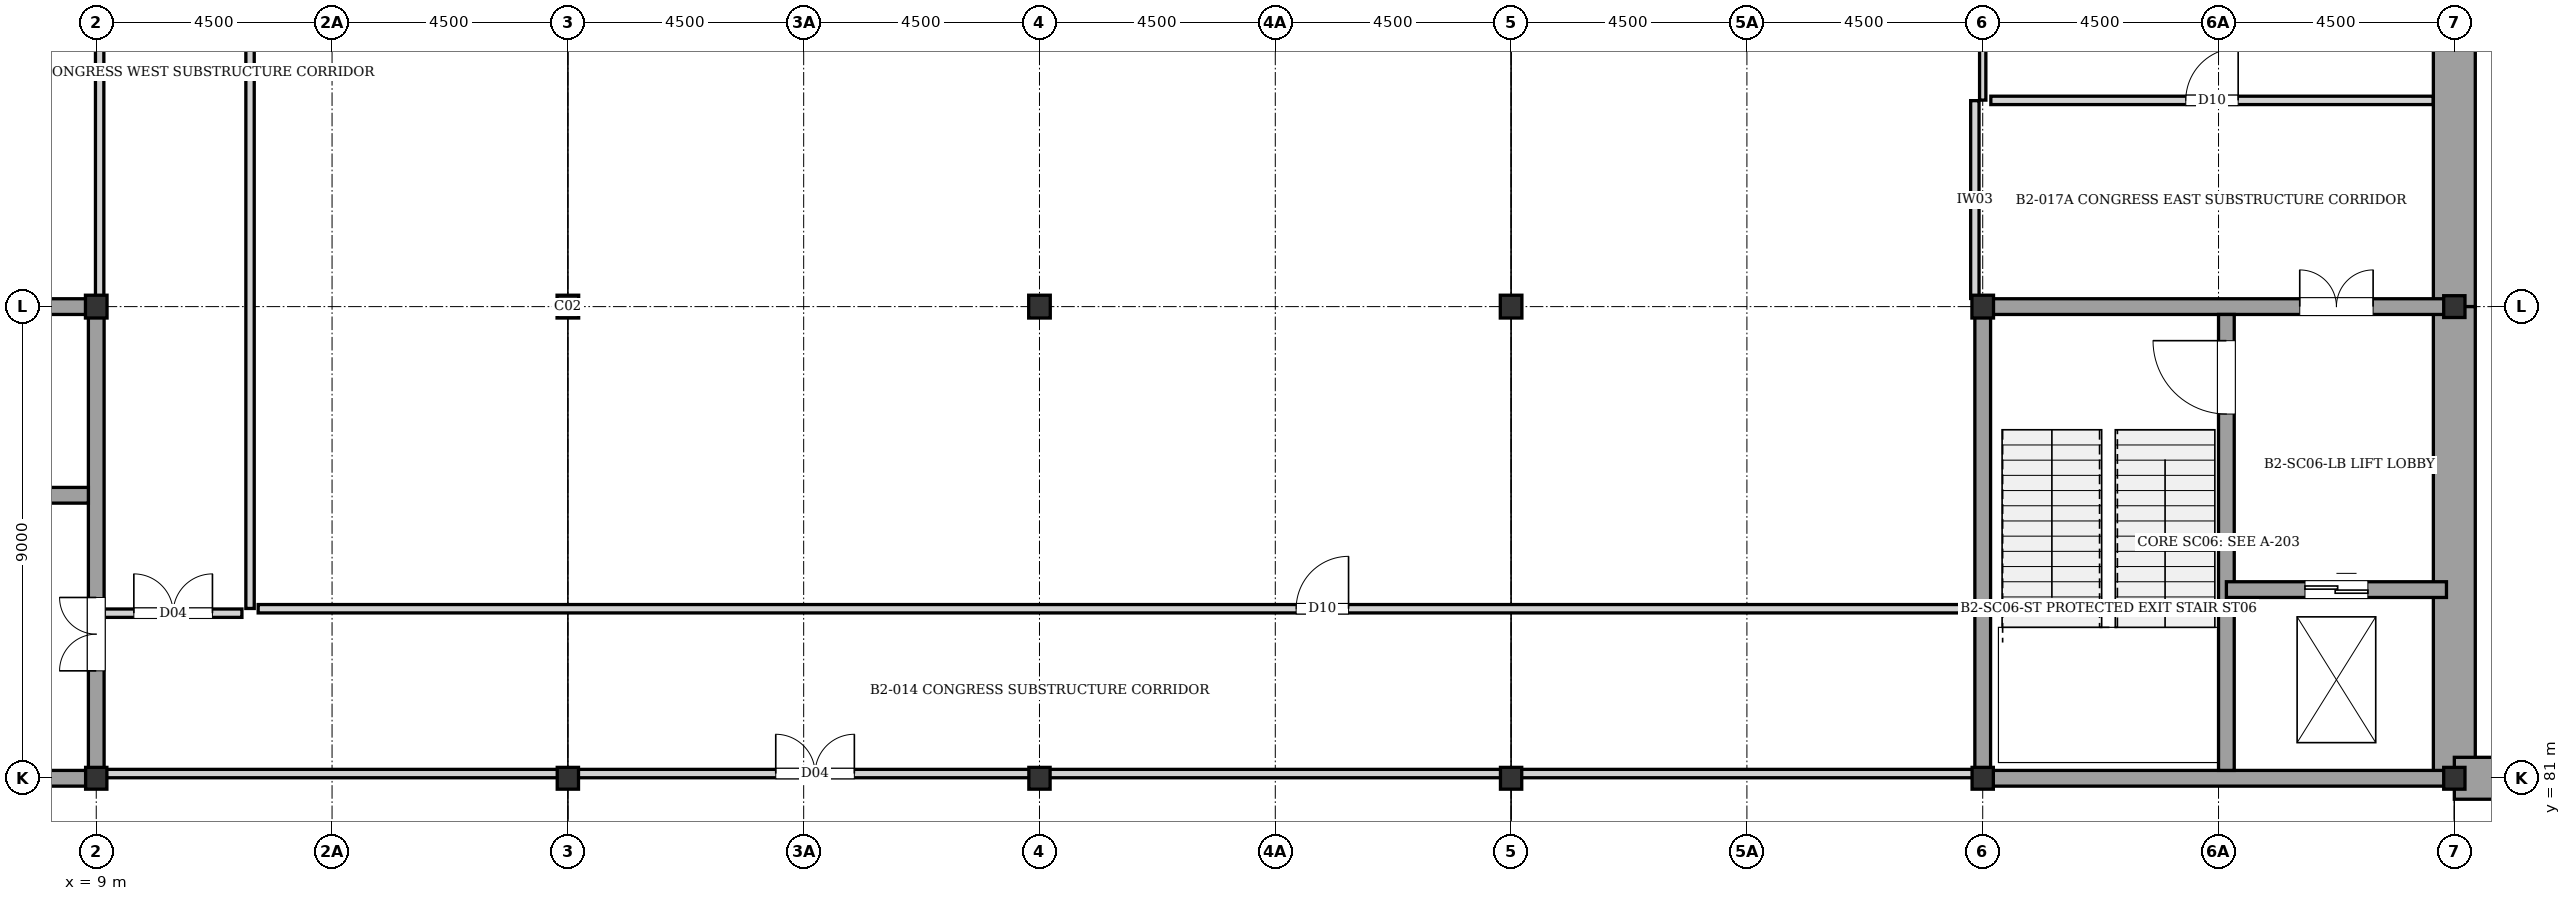
"""IFC4 building model, lengths in metres.
Left out: names, types, materials, properties, quantities, classifications, styles, units other than length and angle.
Written with IfcOpenShell. Run it as: python <this file> out.ifc"""

import sys

from ifc_helpers import new_model, si_unit, direction, frame, frame_2d, origin, origin_2d, place, context, subcontext, project, spatial, rectangle, i_section, extrude, element, fill, save


model = new_model("IFC4")
c1 = context("Model", 3, precision=1e-05, world=origin(), true_north=direction((0.0, 1.0)))
c2 = subcontext(c1, "Body", "Model", "MODEL_VIEW")
j1 = project(units=[si_unit("LENGTHUNIT", "METRE"), si_unit("PLANEANGLEUNIT", "RADIAN")], contexts=[c1])
p1 = place(None, origin())
s1 = spatial("IfcSite", under=j1, at=p1, CompositionType="ELEMENT")
p2 = place(p1, origin())
s2 = spatial("IfcBuilding", under=s1, at=p2, CompositionType="ELEMENT")
p3 = place(p2, frame((0.0, 0.0, -8.96)))
s3 = spatial("IfcBuildingStorey", under=s2, at=p3, CompositionType="ELEMENT", Elevation=-8.96)
p4 = place(p3, frame((9.0, 81.0, 0.0), z_axis=(0.0, 0.0, 1.0), x_axis=(1.0, 0.0, 0.0)))
e1 = element("IfcColumn", 1, at=p4, inside=s3, PredefinedType="COLUMN", context=c2, shape_type="SweptSolid", body=[
    extrude(i_section(OverallWidth=0.406, OverallDepth=0.416, WebThickness=0.022, FlangeThickness=0.038, at=origin_2d()), origin(), (0.0, 0.0, 1.0), 4.48),
])
p5 = place(p3, frame((9.0, 90.0, 0.0), z_axis=(0.0, 0.0, 1.0), x_axis=(1.0, 0.0, 0.0)))
e2 = element("IfcColumn", 2, at=p5, inside=s3, PredefinedType="COLUMN", context=c2, shape_type="SweptSolid", body=[
    extrude(i_section(OverallWidth=0.412, OverallDepth=0.435, WebThickness=0.027, FlangeThickness=0.046, at=origin_2d()), origin(), (0.0, 0.0, 1.0), 4.48),
])
p6 = place(p3, frame((18.0, 81.0, 0.0), z_axis=(0.0, 0.0, 1.0), x_axis=(1.0, 0.0, 0.0)))
e3 = element("IfcColumn", 3, at=p6, inside=s3, PredefinedType="COLUMN", context=c2, shape_type="SweptSolid", body=[
    extrude(i_section(OverallWidth=0.406, OverallDepth=0.416, WebThickness=0.022, FlangeThickness=0.038, at=origin_2d()), origin(), (0.0, 0.0, 1.0), 4.48),
])
p7 = place(p3, frame((18.0, 90.0, 0.0), z_axis=(0.0, 0.0, 1.0), x_axis=(1.0, 0.0, 0.0)))
e4 = element("IfcColumn", 4, at=p7, inside=s3, PredefinedType="COLUMN", context=c2, shape_type="SweptSolid", body=[
    extrude(i_section(OverallWidth=0.412, OverallDepth=0.435, WebThickness=0.027, FlangeThickness=0.046, at=origin_2d()), origin(), (0.0, 0.0, 1.0), 4.48),
])
p8 = place(p3, frame((27.0, 81.0, 0.0), z_axis=(0.0, 0.0, 1.0), x_axis=(1.0, 0.0, 0.0)))
e5 = element("IfcColumn", 5, at=p8, inside=s3, PredefinedType="COLUMN", context=c2, shape_type="SweptSolid", body=[
    extrude(i_section(OverallWidth=0.406, OverallDepth=0.416, WebThickness=0.022, FlangeThickness=0.038, at=origin_2d()), origin(), (0.0, 0.0, 1.0), 4.48),
])
p9 = place(p3, frame((27.0, 90.0, 0.0), z_axis=(0.0, 0.0, 1.0), x_axis=(1.0, 0.0, 0.0)))
e6 = element("IfcColumn", 6, at=p9, inside=s3, PredefinedType="COLUMN", context=c2, shape_type="SweptSolid", body=[
    extrude(i_section(OverallWidth=0.412, OverallDepth=0.435, WebThickness=0.027, FlangeThickness=0.046, at=origin_2d()), origin(), (0.0, 0.0, 1.0), 4.48),
])
p10 = place(p3, frame((36.0, 81.0, 0.0), z_axis=(0.0, 0.0, 1.0), x_axis=(1.0, 0.0, 0.0)))
e7 = element("IfcColumn", 7, at=p10, inside=s3, PredefinedType="COLUMN", context=c2, shape_type="SweptSolid", body=[
    extrude(i_section(OverallWidth=0.406, OverallDepth=0.416, WebThickness=0.022, FlangeThickness=0.038, at=origin_2d()), origin(), (0.0, 0.0, 1.0), 4.48),
])
p11 = place(p3, frame((36.0, 90.0, 0.0), z_axis=(0.0, 0.0, 1.0), x_axis=(1.0, 0.0, 0.0)))
e8 = element("IfcColumn", 8, at=p11, inside=s3, PredefinedType="COLUMN", context=c2, shape_type="SweptSolid", body=[
    extrude(i_section(OverallWidth=0.412, OverallDepth=0.435, WebThickness=0.027, FlangeThickness=0.046, at=origin_2d()), origin(), (0.0, 0.0, 1.0), 4.48),
])
p12 = place(p3, frame((45.0, 81.0, 0.0), z_axis=(0.0, 0.0, 1.0), x_axis=(1.0, 0.0, 0.0)))
e9 = element("IfcColumn", 9, at=p12, inside=s3, PredefinedType="COLUMN", context=c2, shape_type="SweptSolid", body=[
    extrude(i_section(OverallWidth=0.406, OverallDepth=0.416, WebThickness=0.022, FlangeThickness=0.038, at=origin_2d()), origin(), (0.0, 0.0, 1.0), 4.48),
])
p13 = place(p3, frame((45.0, 90.0, 0.0), z_axis=(0.0, 0.0, 1.0), x_axis=(1.0, 0.0, 0.0)))
e10 = element("IfcColumn", 10, at=p13, inside=s3, PredefinedType="COLUMN", context=c2, shape_type="SweptSolid", body=[
    extrude(i_section(OverallWidth=0.412, OverallDepth=0.435, WebThickness=0.027, FlangeThickness=0.046, at=origin_2d()), origin(), (0.0, 0.0, 1.0), 4.48),
])
for number, where, z_axis, x_axis in (
    (11, (54.0, 81.0, 0.0), (0.0, 0.0, 1.0), (1.0, 0.0, 0.0)),
    (12, (54.0, 90.0, 0.0), (0.0, 0.0, 1.0), (1.0, 0.0, 0.0)),
):
    element("IfcColumn", number, at=place(p3, frame(where, z_axis=z_axis, x_axis=x_axis)), inside=s3, PredefinedType="COLUMN", context=c2, shape_type="SweptSolid", body=[
        extrude(i_section(OverallWidth=0.406, OverallDepth=0.416, WebThickness=0.022, FlangeThickness=0.038, at=origin_2d()), origin(), (0.0, 0.0, 1.0), 4.48),
    ])
for number, where, z_axis, x_axis in (
    (13, (54.0, 99.0, 0.0), (0.0, 0.0, 1.0), (0.0, -1.0, 0.0)),
    (14, (54.0, 90.0, 0.0), (0.0, 0.0, 1.0), (0.0, -1.0, 0.0)),
):
    element("IfcWall", number, at=place(p3, frame(where, z_axis=z_axis, x_axis=x_axis)), inside=s3, PredefinedType="USERDEFINED", context=c2, shape_type="SweptSolid", body=[
        extrude(rectangle(XDim=9.0, YDim=0.8, at=frame_2d((4.5, 0.0))), origin(), (0.0, 0.0, 1.0), 4.2),
    ])
p14 = place(p3, frame((54.0, 81.0, 0.0), z_axis=(0.0, 0.0, 1.0), x_axis=(1.0, 0.0, 0.0)))
e15 = element("IfcWall", 15, at=p14, inside=s3, PredefinedType="USERDEFINED", context=c2, shape_type="SweptSolid", body=[
    extrude(rectangle(XDim=9.0, YDim=0.8, at=frame_2d((4.5, 0.0))), origin(), (0.0, 0.0, 1.0), 4.03),
])
p15 = place(p3, frame((0.0, 81.0, 0.0), z_axis=(0.0, 0.0, 1.0), x_axis=(1.0, 0.0, 0.0)))
e16 = element("IfcWall", 16, at=p15, inside=s3, PredefinedType="SHEAR", context=c2, shape_type="SweptSolid", body=[
    extrude(rectangle(XDim=9.0, YDim=0.3, at=frame_2d((4.5, 0.0))), origin(), (0.0, 0.0, 1.0), 4.2),
])
p16 = place(p3, frame((9.0, 81.0, 0.0), z_axis=(0.0, 0.0, 1.0), x_axis=(0.0, 1.0, 0.0)))
e17 = element("IfcWall", 17, at=p16, inside=s3, PredefinedType="SHEAR", context=c2, shape_type="SweptSolid", body=[
    extrude(rectangle(XDim=9.0, YDim=0.3, at=frame_2d((4.5, 0.0))), origin(), (0.0, 0.0, 1.0), 4.2),
])
p17 = place(p16, frame((2.05, 0.0, 0.0)))
e18 = element("IfcOpeningElement", 18, at=p17, cuts=e17, PredefinedType="OPENING", context=c2, shape_type="SweptSolid", body=[
    extrude(rectangle(XDim=1.4, YDim=2.02, at=frame_2d((0.7, 1.01))), frame((0.0, 0.16, 0.0), z_axis=(0.0, -1.0, 0.0), x_axis=(1.0, 0.0, 0.0)), (0.0, 0.0, 1.0), 0.32),
])
p18 = place(p3, frame((0.0, 90.0, 0.0), z_axis=(0.0, 0.0, 1.0), x_axis=(1.0, 0.0, 0.0)))
e19 = element("IfcWall", 19, at=p18, inside=s3, PredefinedType="SHEAR", context=c2, shape_type="SweptSolid", body=[
    extrude(rectangle(XDim=9.0, YDim=0.3, at=frame_2d((4.5, 0.0))), origin(), (0.0, 0.0, 1.0), 4.2),
])
p19 = place(p3, frame((4.65, 86.4, 0.0), z_axis=(0.0, 0.0, 1.0), x_axis=(1.0, 0.0, 0.0)))
e20 = element("IfcWall", 20, at=p19, inside=s3, PredefinedType="SHEAR", context=c2, shape_type="SweptSolid", body=[
    extrude(rectangle(XDim=4.2, YDim=0.3, at=frame_2d((2.1, 0.0))), origin(), (0.0, 0.0, 1.0), 4.2),
])
p20 = place(p19, frame((1.5, 0.0, 0.0)))
e21 = element("IfcOpeningElement", 21, at=p20, cuts=e20, PredefinedType="OPENING", context=c2, shape_type="SweptSolid", body=[
    extrude(rectangle(XDim=1.2, YDim=2.2, at=frame_2d((0.6, 1.1))), frame((0.0, 0.16, 0.0), z_axis=(0.0, -1.0, 0.0), x_axis=(1.0, 0.0, 0.0)), (0.0, 0.0, 1.0), 0.32),
])
p21 = place(p3, frame((45.0, 81.0, 0.0), z_axis=(0.0, 0.0, 1.0), x_axis=(1.0, 0.0, 0.0)))
e22 = element("IfcWall", 22, at=p21, inside=s3, PredefinedType="SHEAR", context=c2, shape_type="SweptSolid", body=[
    extrude(rectangle(XDim=9.0, YDim=0.3, at=frame_2d((4.5, 0.0))), origin(), (0.0, 0.0, 1.0), 4.2),
])
p22 = place(p3, frame((45.0, 90.0, 0.0), z_axis=(0.0, 0.0, 1.0), x_axis=(1.0, 0.0, 0.0)))
e23 = element("IfcWall", 23, at=p22, inside=s3, PredefinedType="SHEAR", context=c2, shape_type="SweptSolid", body=[
    extrude(rectangle(XDim=9.0, YDim=0.3, at=frame_2d((4.5, 0.0))), origin(), (0.0, 0.0, 1.0), 4.2),
])
p23 = place(p22, frame((6.05, 0.0, 0.0)))
e24 = element("IfcOpeningElement", 24, at=p23, cuts=e23, PredefinedType="OPENING", context=c2, shape_type="SweptSolid", body=[
    extrude(rectangle(XDim=1.4, YDim=2.02, at=frame_2d((0.7, 1.01))), frame((0.0, 0.16, 0.0), z_axis=(0.0, -1.0, 0.0), x_axis=(1.0, 0.0, 0.0)), (0.0, 0.0, 1.0), 0.32),
])
p24 = place(p3, frame((45.0, 81.0, 0.0), z_axis=(0.0, 0.0, 1.0), x_axis=(0.0, 1.0, 0.0)))
e25 = element("IfcWall", 25, at=p24, inside=s3, PredefinedType="SHEAR", context=c2, shape_type="SweptSolid", body=[
    extrude(rectangle(XDim=9.0, YDim=0.3, at=frame_2d((4.5, 0.0))), origin(), (0.0, 0.0, 1.0), 4.2),
])
p25 = place(p3, frame((49.65, 81.15, 0.0), z_axis=(0.0, 0.0, 1.0), x_axis=(0.0, 1.0, 0.0)))
e26 = element("IfcWall", 26, at=p25, inside=s3, PredefinedType="SHEAR", context=c2, shape_type="SweptSolid", body=[
    extrude(rectangle(XDim=8.7, YDim=0.3, at=frame_2d((4.35, 0.0))), origin(), (0.0, 0.0, 1.0), 4.2),
])
p26 = place(p25, frame((6.8, 0.0, 0.0)))
e27 = element("IfcOpeningElement", 27, at=p26, cuts=e26, PredefinedType="OPENING", context=c2, shape_type="SweptSolid", body=[
    extrude(rectangle(XDim=1.4, YDim=2.02, at=frame_2d((0.7, 1.01))), frame((0.0, 0.16, 0.0), z_axis=(0.0, -1.0, 0.0), x_axis=(1.0, 0.0, 0.0)), (0.0, 0.0, 1.0), 0.32),
])
p27 = place(p3, frame((49.65, 84.6, 0.0), z_axis=(0.0, 0.0, 1.0), x_axis=(1.0, 0.0, 0.0)))
e28 = element("IfcWall", 28, at=p27, inside=s3, PredefinedType="SHEAR", context=c2, shape_type="SweptSolid", body=[
    extrude(rectangle(XDim=4.2, YDim=0.3, at=frame_2d((2.1, 0.0))), origin(), (0.0, 0.0, 1.0), 4.2),
])
p28 = place(p27, frame((1.5, 0.0, 0.0)))
e29 = element("IfcOpeningElement", 29, at=p28, cuts=e28, PredefinedType="OPENING", context=c2, shape_type="SweptSolid", body=[
    extrude(rectangle(XDim=1.2, YDim=2.2, at=frame_2d((0.6, 1.1))), frame((0.0, 0.16, 0.0), z_axis=(0.0, -1.0, 0.0), x_axis=(1.0, 0.0, 0.0)), (0.0, 0.0, 1.0), 0.32),
])
p29 = place(p3, frame((11.935, 84.24, 0.0), z_axis=(0.0, 0.0, 1.0), x_axis=(0.0, 1.0, 0.0)))
e30 = element("IfcWall", 30, at=p29, inside=s3, PredefinedType="PARTITIONING", context=c2, shape_type="SweptSolid", body=[
    extrude(rectangle(XDim=29.355, YDim=0.16, at=frame_2d((14.677, 0.0))), origin(), (0.0, 0.0, 1.0), 4.2),
])
p30 = place(p3, frame((44.85, 90.155, 0.0), z_axis=(0.0, 0.0, 1.0), x_axis=(0.0, 1.0, 0.0)))
e31 = element("IfcWall", 31, at=p30, inside=s3, PredefinedType="PARTITIONING", context=c2, shape_type="SweptSolid", body=[
    extrude(rectangle(XDim=3.775, YDim=0.16, at=frame_2d((1.887, 0.0))), origin(), (0.0, 0.0, 1.0), 3.3),
])
p31 = place(p3, frame((45.0, 93.94, 0.0), z_axis=(0.0, 0.0, 1.0), x_axis=(0.0, 1.0, 0.0)))
e32 = element("IfcWall", 32, at=p31, inside=s3, PredefinedType="PARTITIONING", context=c2, shape_type="SweptSolid", body=[
    extrude(rectangle(XDim=14.08, YDim=0.12, at=frame_2d((7.04, 0.0))), origin(), (0.0, 0.0, 1.0), 3.3),
])
p32 = place(p3, frame((9.155, 84.15, 0.0), z_axis=(0.0, 0.0, 1.0), x_axis=(1.0, 0.0, 0.0)))
e33 = element("IfcWall", 33, at=p32, inside=s3, PredefinedType="PARTITIONING", context=c2, shape_type="SweptSolid", body=[
    extrude(rectangle(XDim=2.625, YDim=0.16, at=frame_2d((1.312, 0.0))), origin(), (0.0, 0.0, 1.0), 4.2),
])
p33 = place(p32, frame((0.562, 0.0, 0.0)))
e34 = element("IfcOpeningElement", 34, at=p33, cuts=e33, PredefinedType="OPENING", context=c2, shape_type="SweptSolid", body=[
    extrude(rectangle(XDim=1.5, YDim=2.1, at=frame_2d((0.75, 1.05))), frame((0.0, 0.09, 0.0), z_axis=(0.0, -1.0, 0.0), x_axis=(1.0, 0.0, 0.0)), (0.0, 0.0, 1.0), 0.18),
])
p34 = place(p3, frame((12.09, 84.235, 0.0), z_axis=(0.0, 0.0, 1.0), x_axis=(1.0, 0.0, 0.0)))
e35 = element("IfcWall", 35, at=p34, inside=s3, PredefinedType="PARTITIONING", context=c2, shape_type="SweptSolid", body=[
    extrude(rectangle(XDim=32.755, YDim=0.16, at=frame_2d((16.377, 0.0))), origin(), (0.0, 0.0, 1.0), 4.2),
])
p35 = place(p34, frame((19.808, 0.0, 0.0)))
e36 = element("IfcOpeningElement", 36, at=p35, cuts=e35, PredefinedType="OPENING", context=c2, shape_type="SweptSolid", body=[
    extrude(rectangle(XDim=1.0, YDim=2.1, at=frame_2d((0.5, 1.05))), frame((0.0, 0.09, 0.0), z_axis=(0.0, -1.0, 0.0), x_axis=(1.0, 0.0, 0.0)), (0.0, 0.0, 1.0), 0.18),
])
p36 = place(p3, frame((9.155, 81.09, 0.0), z_axis=(0.0, 0.0, 1.0), x_axis=(1.0, 0.0, 0.0)))
e37 = element("IfcWall", 37, at=p36, inside=s3, PredefinedType="PARTITIONING", context=c2, shape_type="SweptSolid", body=[
    extrude(rectangle(XDim=35.69, YDim=0.16, at=frame_2d((17.845, 0.0))), origin(), (0.0, 0.0, 1.0), 3.3),
])
p37 = place(p36, frame((12.812, 0.0, 0.0)))
e38 = element("IfcOpeningElement", 38, at=p37, cuts=e37, PredefinedType="OPENING", context=c2, shape_type="SweptSolid", body=[
    extrude(rectangle(XDim=1.5, YDim=2.1, at=frame_2d((0.75, 1.05))), frame((0.0, 0.09, 0.0), z_axis=(0.0, -1.0, 0.0), x_axis=(1.0, 0.0, 0.0)), (0.0, 0.0, 1.0), 0.18),
])
p38 = place(p3, frame((9.065, 90.155, 0.0), z_axis=(0.0, 0.0, 1.0), x_axis=(0.0, 1.0, 0.0)))
e39 = element("IfcWall", 39, at=p38, inside=s3, PredefinedType="PARTITIONING", context=c2, shape_type="SweptSolid", body=[
    extrude(rectangle(XDim=17.865, YDim=0.16, at=frame_2d((8.933, 0.0))), origin(), (0.0, 0.0, 1.0), 3.3),
])
p39 = place(p38, frame((14.033, 0.0, 0.0)))
e40 = element("IfcOpeningElement", 40, at=p39, cuts=e39, PredefinedType="OPENING", context=c2, shape_type="SweptSolid", body=[
    extrude(rectangle(XDim=1.0, YDim=2.1, at=frame_2d((0.5, 1.05))), frame((0.0, 0.09, 0.0), z_axis=(0.0, -1.0, 0.0), x_axis=(1.0, 0.0, 0.0)), (0.0, 0.0, 1.0), 0.18),
])
p40 = place(p3, frame((45.155, 93.935, 0.0), z_axis=(0.0, 0.0, 1.0), x_axis=(1.0, 0.0, 0.0)))
e41 = element("IfcWall", 41, at=p40, inside=s3, PredefinedType="PARTITIONING", context=c2, shape_type="SweptSolid", body=[
    extrude(rectangle(XDim=8.44, YDim=0.16, at=frame_2d((4.22, 0.0))), origin(), (0.0, 0.0, 1.0), 4.2),
])
p41 = place(p40, frame((3.72, 0.0, 0.0)))
e42 = element("IfcOpeningElement", 42, at=p41, cuts=e41, PredefinedType="OPENING", context=c2, shape_type="SweptSolid", body=[
    extrude(rectangle(XDim=1.0, YDim=2.1, at=frame_2d((0.5, 1.05))), frame((0.0, 0.09, 0.0), z_axis=(0.0, -1.0, 0.0), x_axis=(1.0, 0.0, 0.0)), (0.0, 0.0, 1.0), 0.18),
])
p42 = place(p17, origin())
e43 = element("IfcDoor", 43, at=p42, inside=s3, OperationType="DOUBLE_DOOR_SINGLE_SWING", PredefinedType="DOOR", context=c2, shape_type="SweptSolid", body=[
    extrude(rectangle(XDim=1.4, YDim=2.02, at=frame_2d((0.7, 1.01))), frame((0.0, 0.025, 0.0), z_axis=(0.0, -1.0, 0.0), x_axis=(1.0, 0.0, 0.0)), (0.0, 0.0, 1.0), 0.05),
])
fill(e18, e43)
p43 = place(p23, origin())
e44 = element("IfcDoor", 44, at=p43, inside=s3, OperationType="DOUBLE_DOOR_SINGLE_SWING", PredefinedType="DOOR", context=c2, shape_type="SweptSolid", body=[
    extrude(rectangle(XDim=1.4, YDim=2.02, at=frame_2d((0.7, 1.01))), frame((0.0, 0.025, 0.0), z_axis=(0.0, -1.0, 0.0), x_axis=(1.0, 0.0, 0.0)), (0.0, 0.0, 1.0), 0.05),
])
fill(e24, e44)
p44 = place(p26, origin())
e45 = element("IfcDoor", 45, at=p44, inside=s3, OperationType="SINGLE_SWING_RIGHT", PredefinedType="DOOR", context=c2, shape_type="SweptSolid", body=[
    extrude(rectangle(XDim=1.4, YDim=2.02, at=frame_2d((0.7, 1.01))), frame((0.0, 0.025, 0.0), z_axis=(0.0, -1.0, 0.0), x_axis=(1.0, 0.0, 0.0)), (0.0, 0.0, 1.0), 0.05),
])
fill(e27, e45)
p45 = place(p28, origin())
e46 = element("IfcDoor", 46, at=p45, inside=s3, OperationType="DOUBLE_DOOR_SLIDING", PredefinedType="DOOR", context=c2, shape_type="SweptSolid", body=[
    extrude(rectangle(XDim=1.2, YDim=2.2, at=frame_2d((0.6, 1.1))), frame((0.0, 0.025, 0.0), z_axis=(0.0, -1.0, 0.0), x_axis=(1.0, 0.0, 0.0)), (0.0, 0.0, 1.0), 0.05),
])
fill(e29, e46)
p46 = place(p33, origin())
e47 = element("IfcDoor", 47, at=p46, inside=s3, OperationType="DOUBLE_DOOR_SINGLE_SWING", PredefinedType="DOOR", context=c2, shape_type="SweptSolid", body=[
    extrude(rectangle(XDim=1.5, YDim=2.1, at=frame_2d((0.75, 1.05))), frame((0.0, 0.025, 0.0), z_axis=(0.0, -1.0, 0.0), x_axis=(1.0, 0.0, 0.0)), (0.0, 0.0, 1.0), 0.05),
])
fill(e34, e47)
p47 = place(p35, origin())
e48 = element("IfcDoor", 48, at=p47, inside=s3, OperationType="SINGLE_SWING_RIGHT", PredefinedType="DOOR", context=c2, shape_type="SweptSolid", body=[
    extrude(rectangle(XDim=1.0, YDim=2.1, at=frame_2d((0.5, 1.05))), frame((0.0, 0.025, 0.0), z_axis=(0.0, -1.0, 0.0), x_axis=(1.0, 0.0, 0.0)), (0.0, 0.0, 1.0), 0.05),
])
fill(e36, e48)
p48 = place(p37, origin())
e49 = element("IfcDoor", 49, at=p48, inside=s3, OperationType="DOUBLE_DOOR_SINGLE_SWING", PredefinedType="DOOR", context=c2, shape_type="SweptSolid", body=[
    extrude(rectangle(XDim=1.5, YDim=2.1, at=frame_2d((0.75, 1.05))), frame((0.0, 0.025, 0.0), z_axis=(0.0, -1.0, 0.0), x_axis=(1.0, 0.0, 0.0)), (0.0, 0.0, 1.0), 0.05),
])
fill(e38, e49)
p49 = place(p41, origin())
e50 = element("IfcDoor", 50, at=p49, inside=s3, OperationType="SINGLE_SWING_RIGHT", PredefinedType="DOOR", context=c2, shape_type="SweptSolid", body=[
    extrude(rectangle(XDim=1.0, YDim=2.1, at=frame_2d((0.5, 1.05))), frame((0.0, 0.025, 0.0), z_axis=(0.0, -1.0, 0.0), x_axis=(1.0, 0.0, 0.0)), (0.0, 0.0, 1.0), 0.05),
])
fill(e42, e50)
save(model, sys.argv[1])
